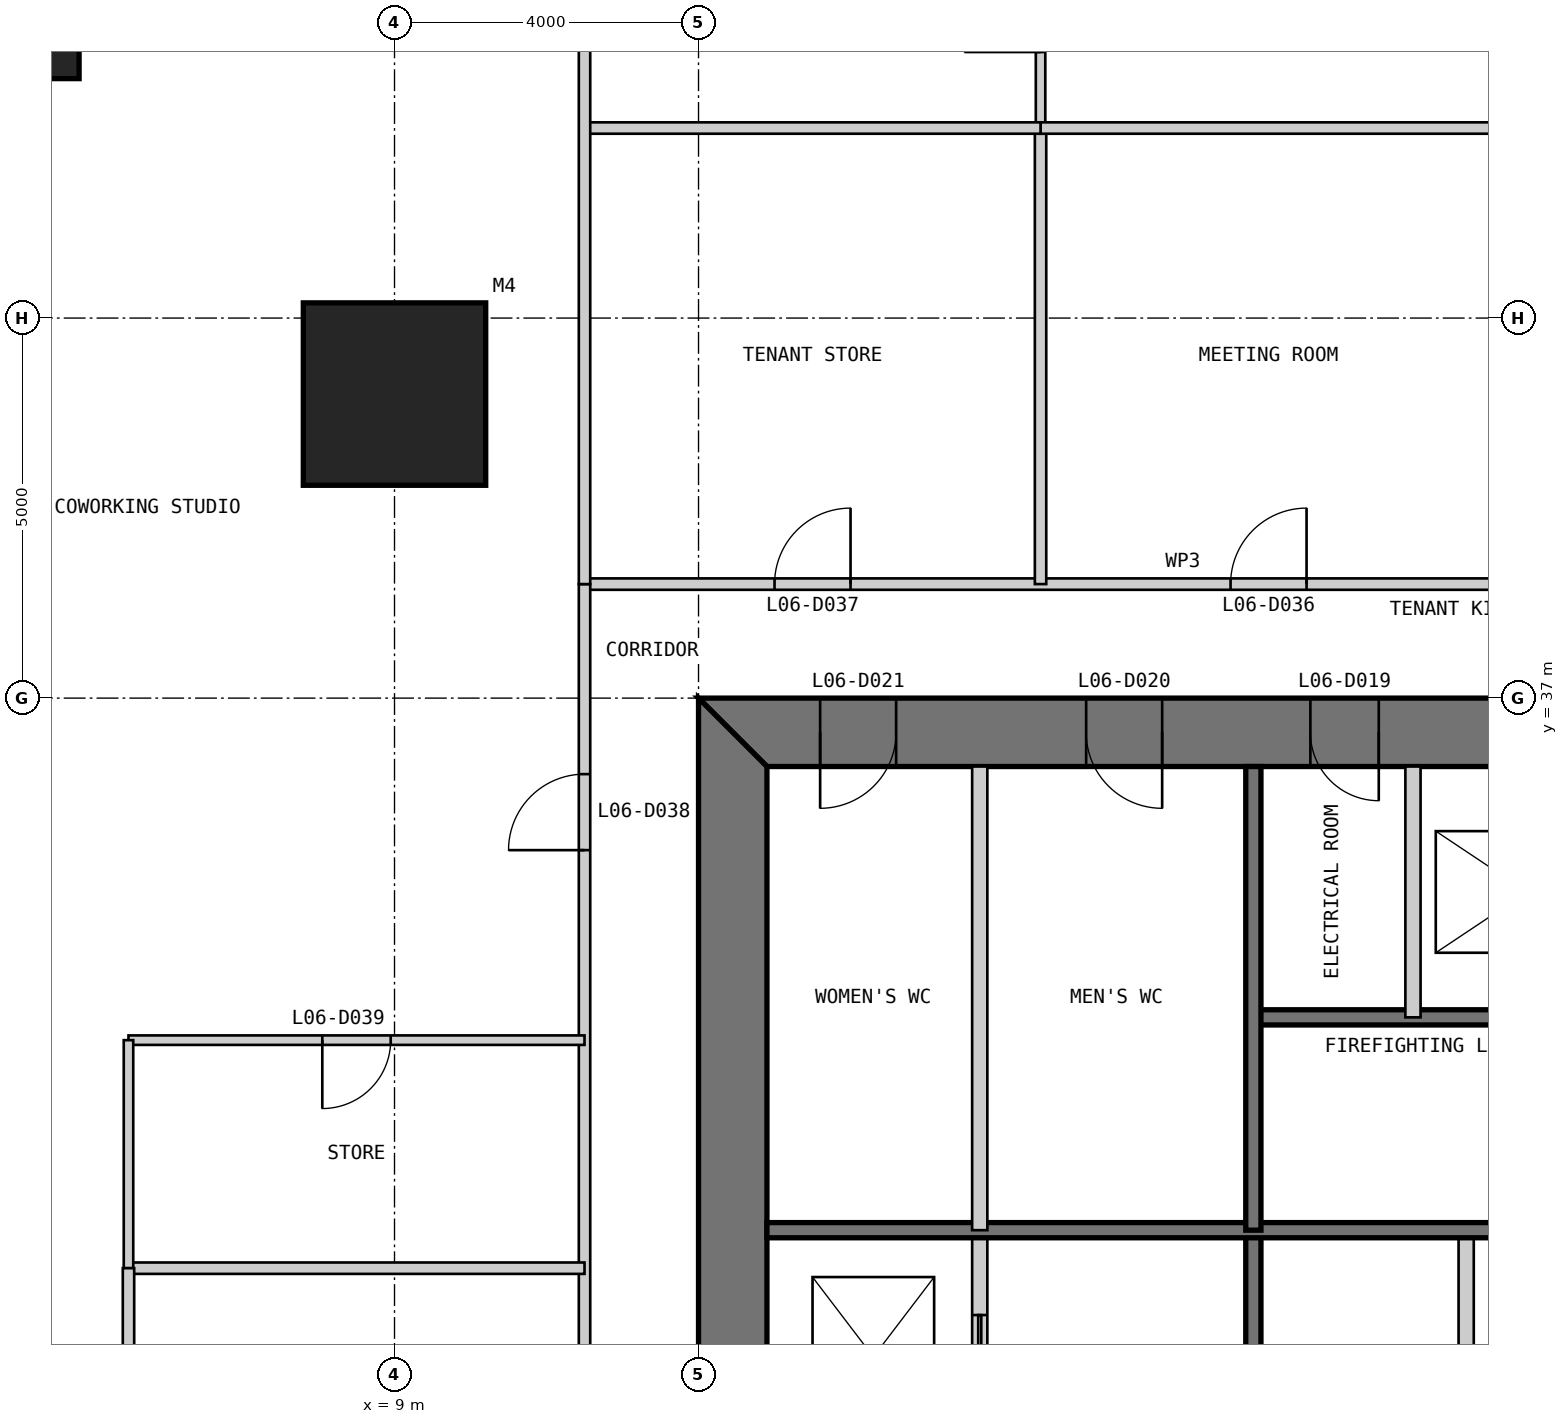
"""IFC4 building model, lengths in metres.
Left out: names, types, materials, properties, quantities, classifications, styles, units other than length and angle.
Written with IfcOpenShell. Run it as: python <this file> out.ifc"""

import sys

from ifc_helpers import new_model, si_unit, direction, frame, frame_2d, origin, origin_2d, place, context, subcontext, project, spatial, polyline, rectangle, outline, extrude, element, fill, save


model = new_model("IFC4")
c1 = context("Model", 3, precision=1e-05, world=origin(), true_north=direction((0.0, 1.0)))
c2 = subcontext(c1, "Body", "Model", "MODEL_VIEW")
j1 = project(units=[si_unit("LENGTHUNIT", "METRE"), si_unit("PLANEANGLEUNIT", "RADIAN")], contexts=[c1])
p1 = place(None, origin())
s1 = spatial("IfcSite", under=j1, at=p1, CompositionType="ELEMENT")
p2 = place(p1, origin())
s2 = spatial("IfcBuilding", under=s1, at=p2, CompositionType="ELEMENT")
p3 = place(p2, frame((0.0, 0.0, 31.0)))
s3 = spatial("IfcBuildingStorey", under=s2, at=p3, CompositionType="ELEMENT", Elevation=31.0)
p4 = place(p3, frame((9.0, 41.0, 0.0), z_axis=(0.0, 0.0, 1.0), x_axis=(1.0, 0.0, 0.0)))
e1 = element("IfcColumn", 1, at=p4, inside=s3, PredefinedType="COLUMN", context=c2, shape_type="SweptSolid", body=[
    extrude(rectangle(XDim=2.4, YDim=2.4, at=origin_2d()), origin(), (0.0, 0.0, 1.0), 4.0),
])
p5 = place(p3, frame((4.1, 45.9, 0.0), z_axis=(0.0, 0.0, 1.0), x_axis=(1.0, 0.0, 0.0)))
e2 = element("IfcColumn", 2, at=p5, inside=s3, PredefinedType="COLUMN", context=c2, shape_type="SweptSolid", body=[
    extrude(rectangle(XDim=1.5, YDim=1.5, at=origin_2d()), origin(), (0.0, 0.0, 1.0), 4.0),
])
p6 = place(p3, frame((37.0, 36.55, 0.0), z_axis=(0.0, 0.0, 1.0), x_axis=(-1.0, 0.0, 0.0)))
e3 = element("IfcWall", 3, at=p6, inside=s3, PredefinedType="SHEAR", context=c2, shape_type="SweptSolid", body=[
    extrude(outline(polyline([(0.0, -0.45), (24.0, -0.45), (23.1, 0.45), (0.9, 0.45), (0.0, -0.45)])), origin(), (0.0, 0.0, 1.0), 4.0),
])
p7 = place(p6, frame((4.9, 0.0, 0.0)))
e4 = element("IfcOpeningElement", 4, at=p7, cuts=e3, PredefinedType="OPENING", context=c2, shape_type="SweptSolid", body=[
    extrude(rectangle(XDim=1.0, YDim=2.2, at=frame_2d((0.5, 1.1))), frame((0.0, 0.46, 0.0), z_axis=(0.0, -1.0, 0.0), x_axis=(1.0, 0.0, 0.0)), (0.0, 0.0, 1.0), 0.92),
])
p8 = place(p6, frame((8.9, 0.0, 0.0)))
e5 = element("IfcOpeningElement", 5, at=p8, cuts=e3, PredefinedType="OPENING", context=c2, shape_type="SweptSolid", body=[
    extrude(rectangle(XDim=1.1, YDim=2.2, at=frame_2d((0.55, 1.1))), frame((0.0, 0.46, 0.0), z_axis=(0.0, -1.0, 0.0), x_axis=(1.0, 0.0, 0.0)), (0.0, 0.0, 1.0), 0.92),
])
p9 = place(p6, frame((15.05, 0.0, 0.0)))
e6 = element("IfcOpeningElement", 6, at=p9, cuts=e3, PredefinedType="OPENING", context=c2, shape_type="SweptSolid", body=[
    extrude(rectangle(XDim=0.9, YDim=2.2, at=frame_2d((0.45, 1.1))), frame((0.0, 0.46, 0.0), z_axis=(0.0, -1.0, 0.0), x_axis=(1.0, 0.0, 0.0)), (0.0, 0.0, 1.0), 0.92),
])
p10 = place(p6, frame((17.9, 0.0, 0.0)))
e7 = element("IfcOpeningElement", 7, at=p10, cuts=e3, PredefinedType="OPENING", context=c2, shape_type="SweptSolid", body=[
    extrude(rectangle(XDim=1.0, YDim=2.2, at=frame_2d((0.5, 1.1))), frame((0.0, 0.46, 0.0), z_axis=(0.0, -1.0, 0.0), x_axis=(1.0, 0.0, 0.0)), (0.0, 0.0, 1.0), 0.92),
])
p11 = place(p6, frame((21.4, 0.0, 0.0)))
e8 = element("IfcOpeningElement", 8, at=p11, cuts=e3, PredefinedType="OPENING", context=c2, shape_type="SweptSolid", body=[
    extrude(rectangle(XDim=1.0, YDim=2.2, at=frame_2d((0.5, 1.1))), frame((0.0, 0.46, 0.0), z_axis=(0.0, -1.0, 0.0), x_axis=(1.0, 0.0, 0.0)), (0.0, 0.0, 1.0), 0.92),
])
p12 = place(p3, frame((13.45, 36.1, 0.0), z_axis=(0.0, 0.0, 1.0), x_axis=(0.0, -1.0, 0.0)))
e9 = element("IfcWall", 9, at=p12, inside=s3, PredefinedType="SHEAR", context=c2, shape_type="SweptSolid", body=[
    extrude(outline(polyline([(-0.9, -0.45), (23.1, -0.45), (22.2, 0.45), (0.0, 0.45), (-0.9, -0.45)])), origin(), (0.0, 0.0, 1.0), 4.0),
])
p13 = place(p12, frame((20.2, 0.0, 0.0)))
e10 = element("IfcOpeningElement", 10, at=p13, cuts=e9, PredefinedType="OPENING", context=c2, shape_type="SweptSolid", body=[
    extrude(rectangle(XDim=1.0, YDim=2.2, at=frame_2d((0.5, 1.1))), frame((0.0, 0.46, 0.0), z_axis=(0.0, -1.0, 0.0), x_axis=(1.0, 0.0, 0.0)), (0.0, 0.0, 1.0), 0.92),
])
p14 = place(p12, frame((17.25, 0.0, 0.0)))
e11 = element("IfcOpeningElement", 11, at=p14, cuts=e9, PredefinedType="OPENING", context=c2, shape_type="SweptSolid", body=[
    extrude(rectangle(XDim=0.9, YDim=2.2, at=frame_2d((0.45, 1.1))), frame((0.0, 0.46, 0.0), z_axis=(0.0, -1.0, 0.0), x_axis=(1.0, 0.0, 0.0)), (0.0, 0.0, 1.0), 0.92),
])
p15 = place(p3, frame((16.7, 13.9, 0.0), z_axis=(0.0, 0.0, 1.0), x_axis=(0.0, 1.0, 0.0)))
e12 = element("IfcWall", 12, at=p15, inside=s3, PredefinedType="PARTITIONING", context=c2, shape_type="SweptSolid", body=[
    extrude(rectangle(XDim=16.1, YDim=0.2, at=frame_2d((8.05, 0.0))), origin(), (0.0, 0.0, 1.0), 3.8),
])
p16 = place(p15, frame((7.217, 0.0, 0.0)))
e13 = element("IfcOpeningElement", 13, at=p16, cuts=e12, PredefinedType="OPENING", context=c2, shape_type="SweptSolid", body=[
    extrude(rectangle(XDim=1.1, YDim=2.2, at=frame_2d((0.55, 1.1))), frame((0.0, 0.11, 0.0), z_axis=(0.0, -1.0, 0.0), x_axis=(1.0, 0.0, 0.0)), (0.0, 0.0, 1.0), 0.22),
])
p17 = place(p15, frame((10.55, 0.0, 0.0)))
e14 = element("IfcOpeningElement", 14, at=p17, cuts=e12, PredefinedType="OPENING", context=c2, shape_type="SweptSolid", body=[
    extrude(rectangle(XDim=1.1, YDim=2.2, at=frame_2d((0.55, 1.1))), frame((0.0, 0.11, 0.0), z_axis=(0.0, -1.0, 0.0), x_axis=(1.0, 0.0, 0.0)), (0.0, 0.0, 1.0), 0.22),
])
p18 = place(p15, frame((13.883, 0.0, 0.0)))
e15 = element("IfcOpeningElement", 15, at=p18, cuts=e12, PredefinedType="OPENING", context=c2, shape_type="SweptSolid", body=[
    extrude(rectangle(XDim=1.1, YDim=2.2, at=frame_2d((0.55, 1.1))), frame((0.0, 0.11, 0.0), z_axis=(0.0, -1.0, 0.0), x_axis=(1.0, 0.0, 0.0)), (0.0, 0.0, 1.0), 0.22),
])
p19 = place(p3, frame((20.3, 13.9, 0.0), z_axis=(0.0, 0.0, 1.0), x_axis=(0.0, 1.0, 0.0)))
e16 = element("IfcWall", 16, at=p19, inside=s3, PredefinedType="SOLIDWALL", context=c2, shape_type="SweptSolid", body=[
    extrude(rectangle(XDim=16.1, YDim=0.2, at=frame_2d((8.05, 0.0))), origin(), (0.0, 0.0, 1.0), 3.8),
])
p20 = place(p3, frame((23.1, 20.0, 0.0), z_axis=(0.0, 0.0, 1.0), x_axis=(0.0, 1.0, 0.0)))
e17 = element("IfcWall", 17, at=p20, inside=s3, PredefinedType="PARTITIONING", context=c2, shape_type="SweptSolid", body=[
    extrude(rectangle(XDim=10.0, YDim=0.2, at=frame_2d((5.0, 0.0))), origin(), (0.0, 0.0, 1.0), 3.8),
])
p21 = place(p3, frame((29.7, 32.8, 0.0), z_axis=(0.0, 0.0, 1.0), x_axis=(-1.0, 0.0, 0.0)))
e18 = element("IfcWall", 18, at=p21, inside=s3, PredefinedType="SOLIDWALL", context=c2, shape_type="SweptSolid", body=[
    extrude(rectangle(XDim=9.4, YDim=0.2, at=frame_2d((4.7, 0.0))), origin(), (0.0, 0.0, 1.0), 3.8),
])
p22 = place(p21, frame((0.25, 0.0, 0.0)))
e19 = element("IfcOpeningElement", 19, at=p22, cuts=e18, PredefinedType="OPENING", context=c2, shape_type="SweptSolid", body=[
    extrude(rectangle(XDim=1.0, YDim=2.2, at=frame_2d((0.5, 1.1))), frame((0.0, 0.11, 0.0), z_axis=(0.0, -1.0, 0.0), x_axis=(1.0, 0.0, 0.0)), (0.0, 0.0, 1.0), 0.22),
])
p23 = place(p3, frame((29.7, 30.0, 0.0), z_axis=(0.0, 0.0, 1.0), x_axis=(-1.0, 0.0, 0.0)))
e20 = element("IfcWall", 20, at=p23, inside=s3, PredefinedType="SOLIDWALL", context=c2, shape_type="SweptSolid", body=[
    extrude(rectangle(XDim=15.8, YDim=0.2, at=frame_2d((7.9, 0.0))), origin(), (0.0, 0.0, 1.0), 3.8),
])
p24 = place(p3, frame((22.4, 36.1, 0.0), z_axis=(0.0, 0.0, 1.0), x_axis=(0.0, -1.0, 0.0)))
e21 = element("IfcWall", 21, at=p24, inside=s3, PredefinedType="PARTITIONING", context=c2, shape_type="SweptSolid", body=[
    extrude(rectangle(XDim=3.3, YDim=0.2, at=frame_2d((1.65, 0.0))), origin(), (0.0, 0.0, 1.0), 3.8),
])
p25 = place(p3, frame((20.3, 36.1, 0.0), z_axis=(0.0, 0.0, 1.0), x_axis=(0.0, -1.0, 0.0)))
e22 = element("IfcWall", 22, at=p25, inside=s3, PredefinedType="SOLIDWALL", context=c2, shape_type="SweptSolid", body=[
    extrude(rectangle(XDim=6.1, YDim=0.2, at=frame_2d((3.05, 0.0))), origin(), (0.0, 0.0, 1.0), 3.8),
])
p26 = place(p3, frame((16.7, 36.1, 0.0), z_axis=(0.0, 0.0, 1.0), x_axis=(0.0, -1.0, 0.0)))
e23 = element("IfcWall", 23, at=p26, inside=s3, PredefinedType="PARTITIONING", context=c2, shape_type="SweptSolid", body=[
    extrude(rectangle(XDim=6.1, YDim=0.2, at=frame_2d((3.05, 0.0))), origin(), (0.0, 0.0, 1.0), 3.8),
])
p27 = place(p3, frame((38.5, 38.5, 0.0), z_axis=(0.0, 0.0, 1.0), x_axis=(-1.0, 0.0, 0.0)))
e24 = element("IfcWall", 24, at=p27, inside=s3, PredefinedType="PARTITIONING", context=c2, shape_type="SweptSolid", body=[
    extrude(rectangle(XDim=27.0, YDim=0.15, at=frame_2d((13.5, 0.0))), origin(), (0.0, 0.0, 1.0), 3.85),
])
p28 = place(p27, frame((5.5, 0.0, 0.0)))
e25 = element("IfcOpeningElement", 25, at=p28, cuts=e24, PredefinedType="OPENING", context=c2, shape_type="SweptSolid", body=[
    extrude(rectangle(XDim=1.0, YDim=2.2, at=frame_2d((0.5, 1.1))), frame((0.0, 0.085, 0.0), z_axis=(0.0, -1.0, 0.0), x_axis=(1.0, 0.0, 0.0)), (0.0, 0.0, 1.0), 0.17),
])
p29 = place(p27, frame((17.5, 0.0, 0.0)))
e26 = element("IfcOpeningElement", 26, at=p29, cuts=e24, PredefinedType="OPENING", context=c2, shape_type="SweptSolid", body=[
    extrude(rectangle(XDim=1.0, YDim=2.2, at=frame_2d((0.5, 1.1))), frame((0.0, 0.085, 0.0), z_axis=(0.0, -1.0, 0.0), x_axis=(1.0, 0.0, 0.0)), (0.0, 0.0, 1.0), 0.17),
])
p30 = place(p27, frame((23.5, 0.0, 0.0)))
e27 = element("IfcOpeningElement", 27, at=p30, cuts=e24, PredefinedType="OPENING", context=c2, shape_type="SweptSolid", body=[
    extrude(rectangle(XDim=1.0, YDim=2.2, at=frame_2d((0.5, 1.1))), frame((0.0, 0.085, 0.0), z_axis=(0.0, -1.0, 0.0), x_axis=(1.0, 0.0, 0.0)), (0.0, 0.0, 1.0), 0.17),
])
p31 = place(p3, frame((17.5, 49.85, 0.0), z_axis=(0.0, 0.0, 1.0), x_axis=(0.0, -1.0, 0.0)))
e28 = element("IfcWall", 28, at=p31, inside=s3, PredefinedType="PARTITIONING", context=c2, shape_type="SweptSolid", body=[
    extrude(rectangle(XDim=5.35, YDim=0.125, at=frame_2d((2.675, 0.0))), origin(), (0.0, 0.0, 1.0), 3.85),
])
p32 = place(p31, frame((3.35, 0.0, 0.0)))
e29 = element("IfcOpeningElement", 29, at=p32, cuts=e28, PredefinedType="OPENING", context=c2, shape_type="SweptSolid", body=[
    extrude(rectangle(XDim=1.0, YDim=2.2, at=frame_2d((0.5, 1.1))), frame((0.0, 0.073, 0.0), z_axis=(0.0, -1.0, 0.0), x_axis=(1.0, 0.0, 0.0)), (0.0, 0.0, 1.0), 0.145),
])
for number, where, z_axis, x_axis in (
    (30, (17.5, 44.5, 0.0), (0.0, 0.0, 1.0), (0.0, -1.0, 0.0)),
    (31, (23.5, 44.5, 0.0), (0.0, 0.0, 1.0), (-1.0, 0.0, 0.0)),
    (32, (17.5, 44.5, 0.0), (0.0, 0.0, 1.0), (-1.0, 0.0, 0.0)),
):
    element("IfcWall", number, at=place(p3, frame(where, z_axis=z_axis, x_axis=x_axis)), inside=s3, PredefinedType="PARTITIONING", context=c2, shape_type="SweptSolid", body=[
        extrude(rectangle(XDim=6.0, YDim=0.15, at=frame_2d((3.0, 0.0))), origin(), (0.0, 0.0, 1.0), 3.85),
    ])
p33 = place(p3, frame((11.5, 38.5, 0.0), z_axis=(0.0, 0.0, 1.0), x_axis=(0.0, -1.0, 0.0)))
e33 = element("IfcWall", 33, at=p33, inside=s3, PredefinedType="PARTITIONING", context=c2, shape_type="SweptSolid", body=[
    extrude(rectangle(XDim=27.0, YDim=0.15, at=frame_2d((13.5, 0.0))), origin(), (0.0, 0.0, 1.0), 3.85),
])
p34 = place(p33, frame((2.5, 0.0, 0.0)))
e34 = element("IfcOpeningElement", 34, at=p34, cuts=e33, PredefinedType="OPENING", context=c2, shape_type="SweptSolid", body=[
    extrude(rectangle(XDim=1.0, YDim=2.2, at=frame_2d((0.5, 1.1))), frame((0.0, 0.085, 0.0), z_axis=(0.0, -1.0, 0.0), x_axis=(1.0, 0.0, 0.0)), (0.0, 0.0, 1.0), 0.17),
])
p35 = place(p33, frame((11.5, 0.0, 0.0)))
e35 = element("IfcOpeningElement", 35, at=p35, cuts=e33, PredefinedType="OPENING", context=c2, shape_type="SweptSolid", body=[
    extrude(rectangle(XDim=1.0, YDim=2.2, at=frame_2d((0.5, 1.1))), frame((0.0, 0.085, 0.0), z_axis=(0.0, -1.0, 0.0), x_axis=(1.0, 0.0, 0.0)), (0.0, 0.0, 1.0), 0.17),
])
p36 = place(p33, frame((17.5, 0.0, 0.0)))
e36 = element("IfcOpeningElement", 36, at=p36, cuts=e33, PredefinedType="OPENING", context=c2, shape_type="SweptSolid", body=[
    extrude(rectangle(XDim=1.0, YDim=2.2, at=frame_2d((0.5, 1.1))), frame((0.0, 0.085, 0.0), z_axis=(0.0, -1.0, 0.0), x_axis=(1.0, 0.0, 0.0)), (0.0, 0.0, 1.0), 0.17),
])
p37 = place(p33, frame((22.0, 0.0, 0.0)))
e37 = element("IfcOpeningElement", 37, at=p37, cuts=e33, PredefinedType="OPENING", context=c2, shape_type="SweptSolid", body=[
    extrude(rectangle(XDim=1.0, YDim=2.2, at=frame_2d((0.5, 1.1))), frame((0.0, 0.085, 0.0), z_axis=(0.0, -1.0, 0.0), x_axis=(1.0, 0.0, 0.0)), (0.0, 0.0, 1.0), 0.17),
])
p38 = place(p33, frame((25.0, 0.0, 0.0)))
e38 = element("IfcOpeningElement", 38, at=p38, cuts=e33, PredefinedType="OPENING", context=c2, shape_type="SweptSolid", body=[
    extrude(rectangle(XDim=1.0, YDim=2.2, at=frame_2d((0.5, 1.1))), frame((0.0, 0.085, 0.0), z_axis=(0.0, -1.0, 0.0), x_axis=(1.0, 0.0, 0.0)), (0.0, 0.0, 1.0), 0.17),
])
p39 = place(p3, frame((11.5, 49.85, 0.0), z_axis=(0.0, 0.0, 1.0), x_axis=(0.0, -1.0, 0.0)))
e39 = element("IfcWall", 39, at=p39, inside=s3, PredefinedType="PARTITIONING", context=c2, shape_type="SweptSolid", body=[
    extrude(rectangle(XDim=11.35, YDim=0.15, at=frame_2d((5.675, 0.0))), origin(), (0.0, 0.0, 1.0), 3.85),
])
p40 = place(p3, frame((5.5, 32.5, 0.0), z_axis=(0.0, 0.0, 1.0), x_axis=(1.0, 0.0, 0.0)))
e40 = element("IfcWall", 40, at=p40, inside=s3, PredefinedType="PARTITIONING", context=c2, shape_type="SweptSolid", body=[
    extrude(rectangle(XDim=6.0, YDim=0.125, at=frame_2d((3.0, 0.0))), origin(), (0.0, 0.0, 1.0), 3.85),
])
p41 = place(p40, frame((2.55, 0.0, 0.0)))
e41 = element("IfcOpeningElement", 41, at=p41, cuts=e40, PredefinedType="OPENING", context=c2, shape_type="SweptSolid", body=[
    extrude(rectangle(XDim=0.9, YDim=2.2, at=frame_2d((0.45, 1.1))), frame((0.0, 0.073, 0.0), z_axis=(0.0, -1.0, 0.0), x_axis=(1.0, 0.0, 0.0)), (0.0, 0.0, 1.0), 0.145),
])
p42 = place(p3, frame((5.5, 29.5, 0.0), z_axis=(0.0, 0.0, 1.0), x_axis=(1.0, 0.0, 0.0)))
e42 = element("IfcWall", 42, at=p42, inside=s3, PredefinedType="PARTITIONING", context=c2, shape_type="SweptSolid", body=[
    extrude(rectangle(XDim=6.0, YDim=0.15, at=frame_2d((3.0, 0.0))), origin(), (0.0, 0.0, 1.0), 3.85),
])
p43 = place(p3, frame((5.5, 32.5, 0.0), z_axis=(0.0, 0.0, 1.0), x_axis=(0.0, -1.0, 0.0)))
e43 = element("IfcWall", 43, at=p43, inside=s3, PredefinedType="PARTITIONING", context=c2, shape_type="SweptSolid", body=[
    extrude(rectangle(XDim=3.0, YDim=0.125, at=frame_2d((1.5, 0.0))), origin(), (0.0, 0.0, 1.0), 3.85),
])
p44 = place(p3, frame((5.5, 29.5, 0.0), z_axis=(0.0, 0.0, 1.0), x_axis=(0.0, -1.0, 0.0)))
e44 = element("IfcWall", 44, at=p44, inside=s3, PredefinedType="PARTITIONING", context=c2, shape_type="SweptSolid", body=[
    extrude(rectangle(XDim=6.0, YDim=0.15, at=frame_2d((3.0, 0.0))), origin(), (0.0, 0.0, 1.0), 3.85),
])
p45 = place(p9, origin())
e45 = element("IfcDoor", 45, at=p45, inside=s3, OperationType="SINGLE_SWING_LEFT", PredefinedType="DOOR", context=c2, shape_type="SweptSolid", body=[
    extrude(rectangle(XDim=0.9, YDim=2.2, at=frame_2d((0.45, 1.1))), frame((0.0, 0.025, 0.0), z_axis=(0.0, -1.0, 0.0), x_axis=(1.0, 0.0, 0.0)), (0.0, 0.0, 1.0), 0.05),
    extrude(outline(polyline([(0.0, 0.0), (0.04, 0.0), (0.04, 2.16), (0.86, 2.16), (0.86, 0.0), (0.9, 0.0), (0.9, 2.2), (0.0, 2.2), (0.0, 0.0)])), frame((0.0, 0.3, 0.0), z_axis=(0.0, -1.0, 0.0), x_axis=(1.0, 0.0, 0.0)), (0.0, 0.0, 1.0), 0.6),
])
fill(e6, e45)
p46 = place(p10, origin())
e46 = element("IfcDoor", 46, at=p46, inside=s3, OperationType="SINGLE_SWING_LEFT", PredefinedType="DOOR", context=c2, shape_type="SweptSolid", body=[
    extrude(rectangle(XDim=1.0, YDim=2.2, at=frame_2d((0.5, 1.1))), frame((0.0, 0.025, 0.0), z_axis=(0.0, -1.0, 0.0), x_axis=(1.0, 0.0, 0.0)), (0.0, 0.0, 1.0), 0.05),
    extrude(outline(polyline([(0.0, 0.0), (0.04, 0.0), (0.04, 2.16), (0.96, 2.16), (0.96, 0.0), (1.0, 0.0), (1.0, 2.2), (0.0, 2.2), (0.0, 0.0)])), frame((0.0, 0.3, 0.0), z_axis=(0.0, -1.0, 0.0), x_axis=(1.0, 0.0, 0.0)), (0.0, 0.0, 1.0), 0.6),
])
fill(e7, e46)
p47 = place(p11, origin())
e47 = element("IfcDoor", 47, at=p47, inside=s3, OperationType="SINGLE_SWING_RIGHT", PredefinedType="DOOR", context=c2, shape_type="SweptSolid", body=[
    extrude(rectangle(XDim=1.0, YDim=2.2, at=frame_2d((0.5, 1.1))), frame((0.0, 0.025, 0.0), z_axis=(0.0, -1.0, 0.0), x_axis=(1.0, 0.0, 0.0)), (0.0, 0.0, 1.0), 0.05),
    extrude(outline(polyline([(0.0, 0.0), (0.04, 0.0), (0.04, 2.16), (0.96, 2.16), (0.96, 0.0), (1.0, 0.0), (1.0, 2.2), (0.0, 2.2), (0.0, 0.0)])), frame((0.0, 0.3, 0.0), z_axis=(0.0, -1.0, 0.0), x_axis=(1.0, 0.0, 0.0)), (0.0, 0.0, 1.0), 0.6),
])
fill(e8, e47)
p48 = place(p29, frame((1.0, 0.0, 0.0), z_axis=(0.0, 0.0, 1.0), x_axis=(-1.0, 0.0, 0.0)))
e48 = element("IfcDoor", 48, at=p48, inside=s3, OperationType="SINGLE_SWING_RIGHT", PredefinedType="DOOR", context=c2, shape_type="SweptSolid", body=[
    extrude(rectangle(XDim=1.0, YDim=2.2, at=frame_2d((0.5, 1.1))), frame((0.0, 0.025, 0.0), z_axis=(0.0, -1.0, 0.0), x_axis=(1.0, 0.0, 0.0)), (0.0, 0.0, 1.0), 0.05),
])
fill(e26, e48)
p49 = place(p30, frame((1.0, 0.0, 0.0), z_axis=(0.0, 0.0, 1.0), x_axis=(-1.0, 0.0, 0.0)))
e49 = element("IfcDoor", 49, at=p49, inside=s3, OperationType="SINGLE_SWING_RIGHT", PredefinedType="DOOR", context=c2, shape_type="SweptSolid", body=[
    extrude(rectangle(XDim=1.0, YDim=2.2, at=frame_2d((0.5, 1.1))), frame((0.0, 0.025, 0.0), z_axis=(0.0, -1.0, 0.0), x_axis=(1.0, 0.0, 0.0)), (0.0, 0.0, 1.0), 0.05),
])
fill(e27, e49)
p50 = place(p34, frame((1.0, 0.0, 0.0), z_axis=(0.0, 0.0, 1.0), x_axis=(-1.0, 0.0, 0.0)))
e50 = element("IfcDoor", 50, at=p50, inside=s3, OperationType="SINGLE_SWING_LEFT", PredefinedType="DOOR", context=c2, shape_type="SweptSolid", body=[
    extrude(rectangle(XDim=1.0, YDim=2.2, at=frame_2d((0.5, 1.1))), frame((0.0, 0.025, 0.0), z_axis=(0.0, -1.0, 0.0), x_axis=(1.0, 0.0, 0.0)), (0.0, 0.0, 1.0), 0.05),
])
fill(e34, e50)
p51 = place(p41, frame((0.9, 0.0, 0.0), z_axis=(0.0, 0.0, 1.0), x_axis=(-1.0, 0.0, 0.0)))
e51 = element("IfcDoor", 51, at=p51, inside=s3, OperationType="SINGLE_SWING_RIGHT", PredefinedType="DOOR", context=c2, shape_type="SweptSolid", body=[
    extrude(rectangle(XDim=0.9, YDim=2.2, at=frame_2d((0.45, 1.1))), frame((0.0, 0.025, 0.0), z_axis=(0.0, -1.0, 0.0), x_axis=(1.0, 0.0, 0.0)), (0.0, 0.0, 1.0), 0.05),
])
fill(e41, e51)
p52 = place(p18, origin())
e52 = element("IfcDoor", 52, at=p52, inside=s3, OperationType="DOUBLE_DOOR_SLIDING", PredefinedType="DOOR", context=c2, shape_type="SweptSolid", body=[
    extrude(rectangle(XDim=1.1, YDim=2.2, at=frame_2d((0.55, 1.1))), frame((0.0, 0.025, 0.0), z_axis=(0.0, -1.0, 0.0), x_axis=(1.0, 0.0, 0.0)), (0.0, 0.0, 1.0), 0.05),
])
fill(e15, e52)
save(model, sys.argv[1])
